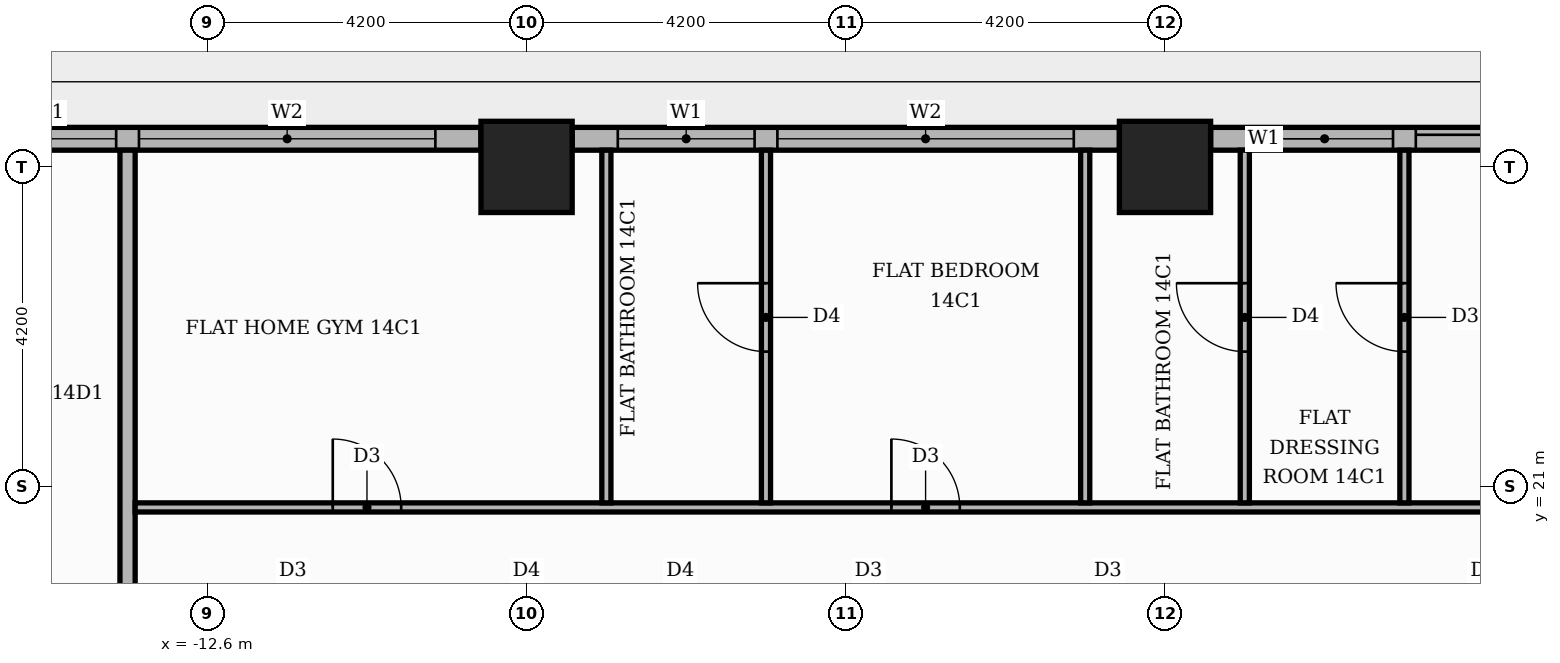
"""IFC4 building model, lengths in metres.
Left out: names, types, materials, properties, quantities, classifications, styles, units other than length and angle.
Written with IfcOpenShell. Run it as: python <this file> out.ifc"""

import sys

from ifc_helpers import new_model, si_unit, direction, frame, frame_2d, origin, origin_2d, place, context, subcontext, project, spatial, rectangle, extrude, element, fill, save


model = new_model("IFC4")
c1 = context("Model", 3, precision=1e-05, world=origin(), true_north=direction((0.0, 1.0)))
c2 = subcontext(c1, "Body", "Model", "MODEL_VIEW")
j1 = project(units=[si_unit("LENGTHUNIT", "METRE"), si_unit("PLANEANGLEUNIT", "RADIAN")], contexts=[c1])
p1 = place(None, origin())
s1 = spatial("IfcSite", under=j1, at=p1, CompositionType="ELEMENT")
p2 = place(p1, origin())
s2 = spatial("IfcBuilding", under=s1, at=p2, CompositionType="ELEMENT")
p3 = place(p2, frame((0.0, 0.0, 62.1)))
s3 = spatial("IfcBuildingStorey", under=s2, at=p3, CompositionType="ELEMENT", Elevation=62.1)
for number, where, z_axis, x_axis in (
    (1, (0.0, 25.2, 0.0), (0.0, 0.0, 1.0), (1.0, 0.0, 0.0)),
    (2, (-8.4, 25.2, 0.0), (0.0, 0.0, 1.0), (1.0, 0.0, 0.0)),
):
    element("IfcColumn", number, at=place(p3, frame(where, z_axis=z_axis, x_axis=x_axis)), inside=s3, PredefinedType="COLUMN", context=c2, shape_type="SweptSolid", body=[
        extrude(rectangle(XDim=1.2, YDim=1.2, at=origin_2d()), origin(), (0.0, 0.0, 1.0), 3.9),
    ])
p4 = place(p3, frame((7.8, 25.57, 0.0), z_axis=(0.0, 0.0, 1.0), x_axis=(-1.0, 0.0, 0.0)))
e3 = element("IfcWall", 3, at=p4, inside=s3, PredefinedType="STANDARD", context=c2, shape_type="SweptSolid", body=[
    extrude(rectangle(XDim=7.2, YDim=0.3, at=frame_2d((3.6, 0.0))), origin(), (0.0, 0.0, 1.0), 3.48),
])
p5 = place(p4, frame((0.6, 0.0, 0.0)))
e4 = element("IfcOpeningElement", 4, at=p5, cuts=e3, PredefinedType="OPENING", context=c2, shape_type="SweptSolid", body=[
    extrude(rectangle(XDim=3.9, YDim=2.4, at=frame_2d((1.95, 1.2))), frame((0.0, 0.16, 0.0), z_axis=(0.0, -1.0, 0.0), x_axis=(1.0, 0.0, 0.0)), (0.0, 0.0, 1.0), 0.32),
])
p6 = place(p4, frame((4.8, 0.0, 0.9)))
e5 = element("IfcOpeningElement", 5, at=p6, cuts=e3, PredefinedType="OPENING", context=c2, shape_type="SweptSolid", body=[
    extrude(rectangle(XDim=1.8, YDim=2.1, at=frame_2d((0.9, 1.05))), frame((0.0, 0.16, 0.0), z_axis=(0.0, -1.0, 0.0), x_axis=(1.0, 0.0, 0.0)), (0.0, 0.0, 1.0), 0.32),
])
p7 = place(p3, frame((-0.6, 25.57, 0.0), z_axis=(0.0, 0.0, 1.0), x_axis=(-1.0, 0.0, 0.0)))
e6 = element("IfcWall", 6, at=p7, inside=s3, PredefinedType="STANDARD", context=c2, shape_type="SweptSolid", body=[
    extrude(rectangle(XDim=7.2, YDim=0.3, at=frame_2d((3.6, 0.0))), origin(), (0.0, 0.0, 1.0), 3.48),
])
p8 = place(p7, frame((0.6, 0.0, 0.9)))
e7 = element("IfcOpeningElement", 7, at=p8, cuts=e6, PredefinedType="OPENING", context=c2, shape_type="SweptSolid", body=[
    extrude(rectangle(XDim=3.9, YDim=2.1, at=frame_2d((1.95, 1.05))), frame((0.0, 0.16, 0.0), z_axis=(0.0, -1.0, 0.0), x_axis=(1.0, 0.0, 0.0)), (0.0, 0.0, 1.0), 0.32),
])
p9 = place(p7, frame((4.8, 0.0, 0.9)))
e8 = element("IfcOpeningElement", 8, at=p9, cuts=e6, PredefinedType="OPENING", context=c2, shape_type="SweptSolid", body=[
    extrude(rectangle(XDim=1.8, YDim=2.1, at=frame_2d((0.9, 1.05))), frame((0.0, 0.16, 0.0), z_axis=(0.0, -1.0, 0.0), x_axis=(1.0, 0.0, 0.0)), (0.0, 0.0, 1.0), 0.32),
])
p10 = place(p3, frame((-9.0, 25.57, 0.0), z_axis=(0.0, 0.0, 1.0), x_axis=(-1.0, 0.0, 0.0)))
e9 = element("IfcWall", 9, at=p10, inside=s3, PredefinedType="STANDARD", context=c2, shape_type="SweptSolid", body=[
    extrude(rectangle(XDim=7.2, YDim=0.3, at=frame_2d((3.6, 0.0))), origin(), (0.0, 0.0, 1.0), 3.48),
])
p11 = place(p10, frame((0.6, 0.0, 0.9)))
e10 = element("IfcOpeningElement", 10, at=p11, cuts=e9, PredefinedType="OPENING", context=c2, shape_type="SweptSolid", body=[
    extrude(rectangle(XDim=3.9, YDim=2.1, at=frame_2d((1.95, 1.05))), frame((0.0, 0.16, 0.0), z_axis=(0.0, -1.0, 0.0), x_axis=(1.0, 0.0, 0.0)), (0.0, 0.0, 1.0), 0.32),
])
p12 = place(p10, frame((4.8, 0.0, 0.9)))
e11 = element("IfcOpeningElement", 11, at=p12, cuts=e9, PredefinedType="OPENING", context=c2, shape_type="SweptSolid", body=[
    extrude(rectangle(XDim=1.8, YDim=2.1, at=frame_2d((0.9, 1.05))), frame((0.0, 0.16, 0.0), z_axis=(0.0, -1.0, 0.0), x_axis=(1.0, 0.0, 0.0)), (0.0, 0.0, 1.0), 0.32),
])
p13 = place(p3, frame((-13.65, 13.75, 0.0), z_axis=(0.0, 0.0, 1.0), x_axis=(0.0, 1.0, 0.0)))
e12 = element("IfcWall", 12, at=p13, inside=s3, PredefinedType="PARTITIONING", context=c2, shape_type="SweptSolid", body=[
    extrude(rectangle(XDim=11.67, YDim=0.2, at=frame_2d((5.835, 0.0))), origin(), (0.0, 0.0, 1.0), 3.48),
])
p14 = place(p3, frame((-13.55, 20.72, 0.0), z_axis=(0.0, 0.0, 1.0), x_axis=(1.0, 0.0, 0.0)))
e13 = element("IfcWall", 13, at=p14, inside=s3, PredefinedType="PARTITIONING", context=c2, shape_type="SweptSolid", body=[
    extrude(rectangle(XDim=38.97, YDim=0.12, at=frame_2d((19.485, 0.0))), origin(), (0.0, 0.0, 1.0), 3.48),
])
p15 = place(p14, frame((25.65, 0.0, 0.0)))
e14 = element("IfcOpeningElement", 14, at=p15, cuts=e13, PredefinedType="OPENING", context=c2, shape_type="SweptSolid", body=[
    extrude(rectangle(XDim=1.0, YDim=2.1, at=frame_2d((0.5, 1.05))), frame((0.0, 0.07, 0.0), z_axis=(0.0, -1.0, 0.0), x_axis=(1.0, 0.0, 0.0)), (0.0, 0.0, 1.0), 0.14),
])
p16 = place(p14, frame((20.45, 0.0, 0.0)))
e15 = element("IfcOpeningElement", 15, at=p16, cuts=e13, PredefinedType="OPENING", context=c2, shape_type="SweptSolid", body=[
    extrude(rectangle(XDim=0.9, YDim=2.1, at=frame_2d((0.45, 1.05))), frame((0.0, 0.07, 0.0), z_axis=(0.0, -1.0, 0.0), x_axis=(1.0, 0.0, 0.0)), (0.0, 0.0, 1.0), 0.14),
])
p17 = place(p14, frame((9.95, 0.0, 0.0)))
e16 = element("IfcOpeningElement", 16, at=p17, cuts=e13, PredefinedType="OPENING", context=c2, shape_type="SweptSolid", body=[
    extrude(rectangle(XDim=0.9, YDim=2.1, at=frame_2d((0.45, 1.05))), frame((0.0, 0.07, 0.0), z_axis=(0.0, -1.0, 0.0), x_axis=(1.0, 0.0, 0.0)), (0.0, 0.0, 1.0), 0.14),
])
p18 = place(p14, frame((2.6, 0.0, 0.0)))
e17 = element("IfcOpeningElement", 17, at=p18, cuts=e13, PredefinedType="OPENING", context=c2, shape_type="SweptSolid", body=[
    extrude(rectangle(XDim=0.9, YDim=2.1, at=frame_2d((0.45, 1.05))), frame((0.0, 0.07, 0.0), z_axis=(0.0, -1.0, 0.0), x_axis=(1.0, 0.0, 0.0)), (0.0, 0.0, 1.0), 0.14),
])
p19 = place(p3, frame((-7.35, 20.78, 0.0), z_axis=(0.0, 0.0, 1.0), x_axis=(0.0, 1.0, 0.0)))
e18 = element("IfcWall", 18, at=p19, inside=s3, PredefinedType="PARTITIONING", context=c2, shape_type="SweptSolid", body=[
    extrude(rectangle(XDim=4.64, YDim=0.12, at=frame_2d((2.32, 0.0))), origin(), (0.0, 0.0, 1.0), 3.48),
])
p20 = place(p3, frame((-5.25, 20.78, 0.0), z_axis=(0.0, 0.0, 1.0), x_axis=(0.0, 1.0, 0.0)))
e19 = element("IfcWall", 19, at=p20, inside=s3, PredefinedType="PARTITIONING", context=c2, shape_type="SweptSolid", body=[
    extrude(rectangle(XDim=4.64, YDim=0.12, at=frame_2d((2.32, 0.0))), origin(), (0.0, 0.0, 1.0), 3.48),
])
p21 = place(p20, frame((1.99, 0.0, 0.0)))
e20 = element("IfcOpeningElement", 20, at=p21, cuts=e19, PredefinedType="OPENING", context=c2, shape_type="SweptSolid", body=[
    extrude(rectangle(XDim=0.9, YDim=2.1, at=frame_2d((0.45, 1.05))), frame((0.0, 0.07, 0.0), z_axis=(0.0, -1.0, 0.0), x_axis=(1.0, 0.0, 0.0)), (0.0, 0.0, 1.0), 0.14),
])
p22 = place(p3, frame((-1.05, 20.78, 0.0), z_axis=(0.0, 0.0, 1.0), x_axis=(0.0, 1.0, 0.0)))
e21 = element("IfcWall", 21, at=p22, inside=s3, PredefinedType="PARTITIONING", context=c2, shape_type="SweptSolid", body=[
    extrude(rectangle(XDim=4.64, YDim=0.12, at=frame_2d((2.32, 0.0))), origin(), (0.0, 0.0, 1.0), 3.48),
])
p23 = place(p3, frame((1.05, 20.78, 0.0), z_axis=(0.0, 0.0, 1.0), x_axis=(0.0, 1.0, 0.0)))
e22 = element("IfcWall", 22, at=p23, inside=s3, PredefinedType="PARTITIONING", context=c2, shape_type="SweptSolid", body=[
    extrude(rectangle(XDim=4.64, YDim=0.12, at=frame_2d((2.32, 0.0))), origin(), (0.0, 0.0, 1.0), 3.48),
])
p24 = place(p23, frame((1.99, 0.0, 0.0)))
e23 = element("IfcOpeningElement", 23, at=p24, cuts=e22, PredefinedType="OPENING", context=c2, shape_type="SweptSolid", body=[
    extrude(rectangle(XDim=0.9, YDim=2.1, at=frame_2d((0.45, 1.05))), frame((0.0, 0.07, 0.0), z_axis=(0.0, -1.0, 0.0), x_axis=(1.0, 0.0, 0.0)), (0.0, 0.0, 1.0), 0.14),
])
p25 = place(p3, frame((3.15, 20.78, 0.0), z_axis=(0.0, 0.0, 1.0), x_axis=(0.0, 1.0, 0.0)))
e24 = element("IfcWall", 24, at=p25, inside=s3, PredefinedType="PARTITIONING", context=c2, shape_type="SweptSolid", body=[
    extrude(rectangle(XDim=4.64, YDim=0.12, at=frame_2d((2.32, 0.0))), origin(), (0.0, 0.0, 1.0), 3.48),
])
p26 = place(p25, frame((1.99, 0.0, 0.0)))
e25 = element("IfcOpeningElement", 25, at=p26, cuts=e24, PredefinedType="OPENING", context=c2, shape_type="SweptSolid", body=[
    extrude(rectangle(XDim=0.9, YDim=2.1, at=frame_2d((0.45, 1.05))), frame((0.0, 0.07, 0.0), z_axis=(0.0, -1.0, 0.0), x_axis=(1.0, 0.0, 0.0)), (0.0, 0.0, 1.0), 0.14),
])
p27 = place(p5, origin())
e26 = element("IfcDoor", 26, at=p27, inside=s3, OperationType="SLIDING_TO_LEFT", PredefinedType="DOOR", context=c2, shape_type="SweptSolid", body=[
    extrude(rectangle(XDim=3.9, YDim=2.4, at=frame_2d((1.95, 1.2))), frame((0.0, 0.025, 0.0), z_axis=(0.0, -1.0, 0.0), x_axis=(1.0, 0.0, 0.0)), (0.0, 0.0, 1.0), 0.05),
])
fill(e4, e26)
p28 = place(p6, origin())
e27 = element("IfcWindow", 27, at=p28, inside=s3, PartitioningType="SINGLE_PANEL", PredefinedType="WINDOW", context=c2, shape_type="SweptSolid", body=[
    extrude(rectangle(XDim=1.8, YDim=2.1, at=frame_2d((0.9, 1.05))), frame((0.0, 0.03, 0.0), z_axis=(0.0, -1.0, 0.0), x_axis=(1.0, 0.0, 0.0)), (0.0, 0.0, 1.0), 0.06),
])
fill(e5, e27)
p29 = place(p8, origin())
e28 = element("IfcWindow", 28, at=p29, inside=s3, PartitioningType="SINGLE_PANEL", PredefinedType="WINDOW", context=c2, shape_type="SweptSolid", body=[
    extrude(rectangle(XDim=3.9, YDim=2.1, at=frame_2d((1.95, 1.05))), frame((0.0, 0.03, 0.0), z_axis=(0.0, -1.0, 0.0), x_axis=(1.0, 0.0, 0.0)), (0.0, 0.0, 1.0), 0.06),
])
fill(e7, e28)
p30 = place(p9, origin())
e29 = element("IfcWindow", 29, at=p30, inside=s3, PartitioningType="SINGLE_PANEL", PredefinedType="WINDOW", context=c2, shape_type="SweptSolid", body=[
    extrude(rectangle(XDim=1.8, YDim=2.1, at=frame_2d((0.9, 1.05))), frame((0.0, 0.03, 0.0), z_axis=(0.0, -1.0, 0.0), x_axis=(1.0, 0.0, 0.0)), (0.0, 0.0, 1.0), 0.06),
])
fill(e8, e29)
p31 = place(p11, origin())
e30 = element("IfcWindow", 30, at=p31, inside=s3, PartitioningType="SINGLE_PANEL", PredefinedType="WINDOW", context=c2, shape_type="SweptSolid", body=[
    extrude(rectangle(XDim=3.9, YDim=2.1, at=frame_2d((1.95, 1.05))), frame((0.0, 0.03, 0.0), z_axis=(0.0, -1.0, 0.0), x_axis=(1.0, 0.0, 0.0)), (0.0, 0.0, 1.0), 0.06),
])
fill(e10, e30)
p32 = place(p12, origin())
e31 = element("IfcWindow", 31, at=p32, inside=s3, PartitioningType="SINGLE_PANEL", PredefinedType="WINDOW", context=c2, shape_type="SweptSolid", body=[
    extrude(rectangle(XDim=1.8, YDim=2.1, at=frame_2d((0.9, 1.05))), frame((0.0, 0.03, 0.0), z_axis=(0.0, -1.0, 0.0), x_axis=(1.0, 0.0, 0.0)), (0.0, 0.0, 1.0), 0.06),
])
fill(e11, e31)
p33 = place(p26, origin())
e32 = element("IfcDoor", 32, at=p33, inside=s3, OperationType="SINGLE_SWING_RIGHT", PredefinedType="DOOR", context=c2, shape_type="SweptSolid", body=[
    extrude(rectangle(XDim=0.9, YDim=2.1, at=frame_2d((0.45, 1.05))), frame((0.0, 0.025, 0.0), z_axis=(0.0, -1.0, 0.0), x_axis=(1.0, 0.0, 0.0)), (0.0, 0.0, 1.0), 0.05),
])
fill(e25, e32)
p34 = place(p24, origin())
e33 = element("IfcDoor", 33, at=p34, inside=s3, OperationType="SINGLE_SWING_RIGHT", PredefinedType="DOOR", context=c2, shape_type="SweptSolid", body=[
    extrude(rectangle(XDim=0.9, YDim=2.1, at=frame_2d((0.45, 1.05))), frame((0.0, 0.025, 0.0), z_axis=(0.0, -1.0, 0.0), x_axis=(1.0, 0.0, 0.0)), (0.0, 0.0, 1.0), 0.05),
])
fill(e23, e33)
p35 = place(p17, origin())
e34 = element("IfcDoor", 34, at=p35, inside=s3, OperationType="SINGLE_SWING_LEFT", PredefinedType="DOOR", context=c2, shape_type="SweptSolid", body=[
    extrude(rectangle(XDim=0.9, YDim=2.1, at=frame_2d((0.45, 1.05))), frame((0.0, 0.025, 0.0), z_axis=(0.0, -1.0, 0.0), x_axis=(1.0, 0.0, 0.0)), (0.0, 0.0, 1.0), 0.05),
])
fill(e16, e34)
p36 = place(p21, origin())
e35 = element("IfcDoor", 35, at=p36, inside=s3, OperationType="SINGLE_SWING_RIGHT", PredefinedType="DOOR", context=c2, shape_type="SweptSolid", body=[
    extrude(rectangle(XDim=0.9, YDim=2.1, at=frame_2d((0.45, 1.05))), frame((0.0, 0.025, 0.0), z_axis=(0.0, -1.0, 0.0), x_axis=(1.0, 0.0, 0.0)), (0.0, 0.0, 1.0), 0.05),
])
fill(e20, e35)
p37 = place(p18, origin())
e36 = element("IfcDoor", 36, at=p37, inside=s3, OperationType="SINGLE_SWING_LEFT", PredefinedType="DOOR", context=c2, shape_type="SweptSolid", body=[
    extrude(rectangle(XDim=0.9, YDim=2.1, at=frame_2d((0.45, 1.05))), frame((0.0, 0.025, 0.0), z_axis=(0.0, -1.0, 0.0), x_axis=(1.0, 0.0, 0.0)), (0.0, 0.0, 1.0), 0.05),
])
fill(e17, e36)
save(model, sys.argv[1])
